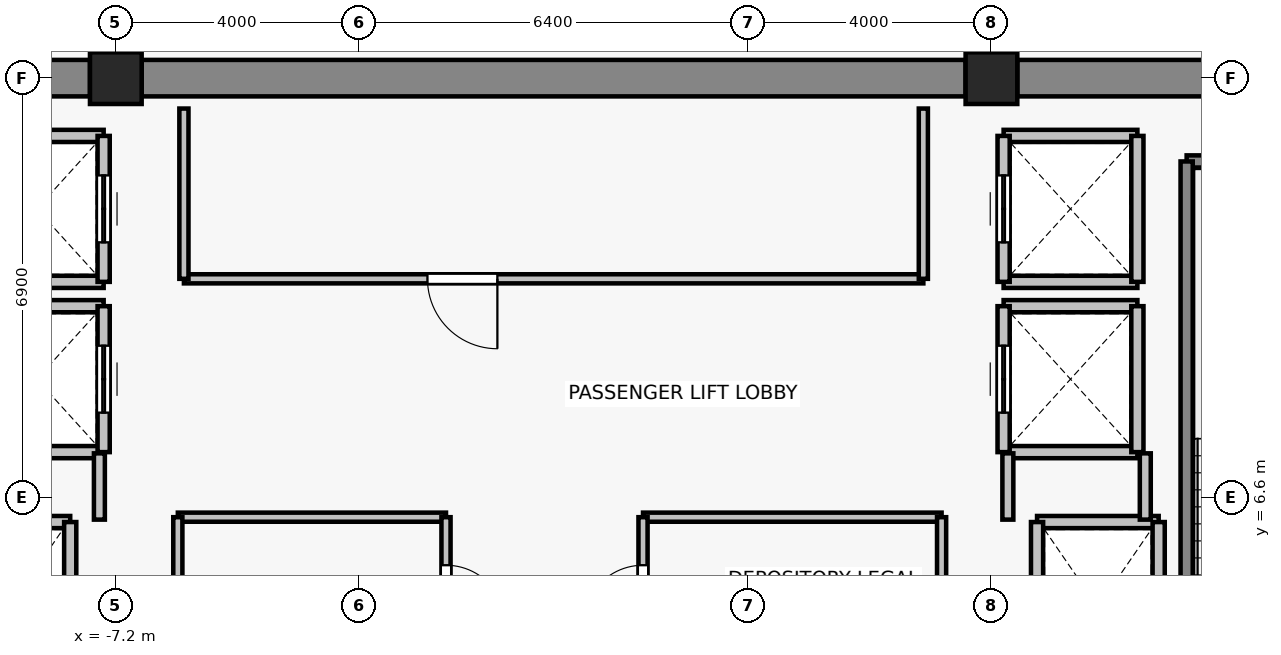
"""IFC4 building model, lengths in metres.
Left out: names, types, materials, properties, quantities, classifications, styles, units other than length and angle.
Written with IfcOpenShell. Run it as: python <this file> out.ifc"""

import sys

from ifc_helpers import new_model, si_unit, direction, frame, frame_2d, origin, origin_2d, place, context, subcontext, project, spatial, rectangle, extrude, source, transform, mapped, element, fill, save


model = new_model("IFC4")
c1 = context("Model", 3, precision=1e-05, world=origin(), true_north=direction((0.0, 1.0)))
c2 = subcontext(c1, "Body", "Model", "MODEL_VIEW")
j1 = project(units=[si_unit("LENGTHUNIT", "METRE"), si_unit("PLANEANGLEUNIT", "RADIAN")], contexts=[c1])
p1 = place(None, origin())
s1 = spatial("IfcSite", under=j1, at=p1, CompositionType="ELEMENT")
p2 = place(p1, origin())
s2 = spatial("IfcBuilding", under=s1, at=p2, CompositionType="ELEMENT")
p3 = place(p2, frame((0.0, 0.0, 232.0)))
s3 = spatial("IfcBuildingStorey", under=s2, at=p3, CompositionType="ELEMENT", Elevation=232.0)
for number, where, z_axis, x_axis in (
    (1, (-7.2, 13.5, 0.0), (0.0, 0.0, 1.0), (1.0, 0.0, 0.0)),
    (2, (7.2, 13.5, 0.0), (0.0, 0.0, 1.0), (1.0, 0.0, 0.0)),
):
    element("IfcColumn", number, at=place(p3, frame(where, z_axis=z_axis, x_axis=x_axis)), inside=s3, PredefinedType="COLUMN", context=c2, shape_type="SweptSolid", body=[
        extrude(rectangle(XDim=0.85, YDim=0.85, at=origin_2d()), origin(), (0.0, 0.0, 1.0), 3.3),
    ])
p4 = place(p3, frame((-13.975, 13.5, 0.0), z_axis=(0.0, 0.0, 1.0), x_axis=(1.0, 0.0, 0.0)))
e3 = element("IfcWall", 3, at=p4, inside=s3, PredefinedType="SHEAR", context=c2, shape_type="SweptSolid", body=[
    extrude(rectangle(XDim=6.35, YDim=0.6, at=frame_2d((3.175, 0.0))), origin(), (0.0, 0.0, 1.0), 3.075),
])
p5 = place(p3, frame((-6.775, 13.5, 0.0), z_axis=(0.0, 0.0, 1.0), x_axis=(1.0, 0.0, 0.0)))
e4 = element("IfcWall", 4, at=p5, inside=s3, PredefinedType="SHEAR", context=c2, shape_type="SweptSolid", body=[
    extrude(rectangle(XDim=13.55, YDim=0.6, at=frame_2d((6.775, 0.0))), origin(), (0.0, 0.0, 1.0), 3.075),
])
p6 = place(p3, frame((7.625, 13.5, 0.0), z_axis=(0.0, 0.0, 1.0), x_axis=(1.0, 0.0, 0.0)))
e5 = element("IfcWall", 5, at=p6, inside=s3, PredefinedType="SHEAR", context=c2, shape_type="SweptSolid", body=[
    extrude(rectangle(XDim=6.35, YDim=0.6, at=frame_2d((3.175, 0.0))), origin(), (0.0, 0.0, 1.0), 3.075),
])
p7 = place(p3, frame((-9.95, 6.2, 0.0), z_axis=(0.0, 0.0, 1.0), x_axis=(1.0, 0.0, 0.0)))
e6 = element("IfcWall", 6, at=p7, inside=s3, PredefinedType="SOLIDWALL", context=c2, shape_type="SweptSolid", body=[
    extrude(rectangle(XDim=2.0, YDim=0.2, at=frame_2d((1.0, 0.0))), origin(), (0.0, 0.0, 1.0), 3.075),
])
p8 = place(p3, frame((-7.95, 6.2, 0.0), z_axis=(0.0, 0.0, 1.0), x_axis=(0.0, -1.0, 0.0)))
e7 = element("IfcWall", 7, at=p8, inside=s3, PredefinedType="SOLIDWALL", context=c2, shape_type="SweptSolid", body=[
    extrude(rectangle(XDim=2.8, YDim=0.2, at=frame_2d((1.4, 0.0))), origin(), (0.0, 0.0, 1.0), 3.075),
])
p9 = place(p3, frame((7.95, 6.2, 0.0), z_axis=(0.0, 0.0, 1.0), x_axis=(1.0, 0.0, 0.0)))
e8 = element("IfcWall", 8, at=p9, inside=s3, PredefinedType="SOLIDWALL", context=c2, shape_type="SweptSolid", body=[
    extrude(rectangle(XDim=2.0, YDim=0.2, at=frame_2d((1.0, 0.0))), origin(), (0.0, 0.0, 1.0), 3.075),
])
for number, where, z_axis, x_axis in (
    (9, (7.95, 3.4, 0.0), (0.0, 0.0, 1.0), (0.0, 1.0, 0.0)),
    (10, (9.95, 6.2, 0.0), (0.0, 0.0, 1.0), (0.0, -1.0, 0.0)),
):
    element("IfcWall", number, at=place(p3, frame(where, z_axis=z_axis, x_axis=x_axis)), inside=s3, PredefinedType="SOLIDWALL", context=c2, shape_type="SweptSolid", body=[
        extrude(rectangle(XDim=2.8, YDim=0.2, at=frame_2d((1.4, 0.0))), origin(), (0.0, 0.0, 1.0), 3.075),
    ])
for number, where, z_axis, x_axis in (
    (11, (-7.4, 7.35, 0.0), (0.0, 0.0, 1.0), (-1.0, 0.0, 0.0)),
    (12, (-9.6, 9.75, 0.0), (0.0, 0.0, 1.0), (1.0, 0.0, 0.0)),
):
    element("IfcWall", number, at=place(p3, frame(where, z_axis=z_axis, x_axis=x_axis)), inside=s3, PredefinedType="SOLIDWALL", context=c2, shape_type="SweptSolid", body=[
        extrude(rectangle(XDim=2.2, YDim=0.2, at=frame_2d((1.1, 0.0))), origin(), (0.0, 0.0, 1.0), 2.615),
    ])
p10 = place(p3, frame((-7.4, 9.75, 0.0), z_axis=(0.0, 0.0, 1.0), x_axis=(0.0, -1.0, 0.0)))
e13 = element("IfcWall", 13, at=p10, inside=s3, PredefinedType="SOLIDWALL", context=c2, shape_type="SweptSolid", body=[
    extrude(rectangle(XDim=2.4, YDim=0.2, at=frame_2d((1.2, 0.0))), origin(), (0.0, 0.0, 1.0), 2.615),
])
p11 = place(p10, frame((0.65, 0.0, 0.0)))
e14 = element("IfcOpeningElement", 14, at=p11, cuts=e13, PredefinedType="OPENING", context=c2, shape_type="SweptSolid", body=[
    extrude(rectangle(XDim=1.1, YDim=2.2, at=frame_2d((0.55, 1.1))), frame((0.0, 0.11, 0.0), z_axis=(0.0, -1.0, 0.0), x_axis=(1.0, 0.0, 0.0)), (0.0, 0.0, 1.0), 0.22),
])
for number, where, z_axis, x_axis in (
    (15, (-7.4, 10.15, 0.0), (0.0, 0.0, 1.0), (-1.0, 0.0, 0.0)),
    (16, (-9.6, 12.55, 0.0), (0.0, 0.0, 1.0), (1.0, 0.0, 0.0)),
):
    element("IfcWall", number, at=place(p3, frame(where, z_axis=z_axis, x_axis=x_axis)), inside=s3, PredefinedType="SOLIDWALL", context=c2, shape_type="SweptSolid", body=[
        extrude(rectangle(XDim=2.2, YDim=0.2, at=frame_2d((1.1, 0.0))), origin(), (0.0, 0.0, 1.0), 2.615),
    ])
p12 = place(p3, frame((-7.4, 12.55, 0.0), z_axis=(0.0, 0.0, 1.0), x_axis=(0.0, -1.0, 0.0)))
e17 = element("IfcWall", 17, at=p12, inside=s3, PredefinedType="SOLIDWALL", context=c2, shape_type="SweptSolid", body=[
    extrude(rectangle(XDim=2.4, YDim=0.2, at=frame_2d((1.2, 0.0))), origin(), (0.0, 0.0, 1.0), 2.615),
])
p13 = place(p12, frame((0.65, 0.0, 0.0)))
e18 = element("IfcOpeningElement", 18, at=p13, cuts=e17, PredefinedType="OPENING", context=c2, shape_type="SweptSolid", body=[
    extrude(rectangle(XDim=1.1, YDim=2.2, at=frame_2d((0.55, 1.1))), frame((0.0, 0.11, 0.0), z_axis=(0.0, -1.0, 0.0), x_axis=(1.0, 0.0, 0.0)), (0.0, 0.0, 1.0), 0.22),
])
for number, where, z_axis, x_axis in (
    (19, (9.6, 7.35, 0.0), (0.0, 0.0, 1.0), (-1.0, 0.0, 0.0)),
    (20, (7.4, 9.75, 0.0), (0.0, 0.0, 1.0), (1.0, 0.0, 0.0)),
):
    element("IfcWall", number, at=place(p3, frame(where, z_axis=z_axis, x_axis=x_axis)), inside=s3, PredefinedType="SOLIDWALL", context=c2, shape_type="SweptSolid", body=[
        extrude(rectangle(XDim=2.2, YDim=0.2, at=frame_2d((1.1, 0.0))), origin(), (0.0, 0.0, 1.0), 2.615),
    ])
p14 = place(p3, frame((7.4, 7.35, 0.0), z_axis=(0.0, 0.0, 1.0), x_axis=(0.0, 1.0, 0.0)))
e21 = element("IfcWall", 21, at=p14, inside=s3, PredefinedType="SOLIDWALL", context=c2, shape_type="SweptSolid", body=[
    extrude(rectangle(XDim=2.4, YDim=0.2, at=frame_2d((1.2, 0.0))), origin(), (0.0, 0.0, 1.0), 2.615),
])
p15 = place(p14, frame((0.65, 0.0, 0.0)))
e22 = element("IfcOpeningElement", 22, at=p15, cuts=e21, PredefinedType="OPENING", context=c2, shape_type="SweptSolid", body=[
    extrude(rectangle(XDim=1.1, YDim=2.2, at=frame_2d((0.55, 1.1))), frame((0.0, 0.11, 0.0), z_axis=(0.0, -1.0, 0.0), x_axis=(1.0, 0.0, 0.0)), (0.0, 0.0, 1.0), 0.22),
])
p16 = place(p3, frame((9.6, 9.75, 0.0), z_axis=(0.0, 0.0, 1.0), x_axis=(0.0, -1.0, 0.0)))
e23 = element("IfcWall", 23, at=p16, inside=s3, PredefinedType="SOLIDWALL", context=c2, shape_type="SweptSolid", body=[
    extrude(rectangle(XDim=2.4, YDim=0.2, at=frame_2d((1.2, 0.0))), origin(), (0.0, 0.0, 1.0), 3.075),
])
for number, where, z_axis, x_axis in (
    (24, (9.6, 10.15, 0.0), (0.0, 0.0, 1.0), (-1.0, 0.0, 0.0)),
    (25, (7.4, 12.55, 0.0), (0.0, 0.0, 1.0), (1.0, 0.0, 0.0)),
):
    element("IfcWall", number, at=place(p3, frame(where, z_axis=z_axis, x_axis=x_axis)), inside=s3, PredefinedType="SOLIDWALL", context=c2, shape_type="SweptSolid", body=[
        extrude(rectangle(XDim=2.2, YDim=0.2, at=frame_2d((1.1, 0.0))), origin(), (0.0, 0.0, 1.0), 2.615),
    ])
p17 = place(p3, frame((7.4, 10.15, 0.0), z_axis=(0.0, 0.0, 1.0), x_axis=(0.0, 1.0, 0.0)))
e26 = element("IfcWall", 26, at=p17, inside=s3, PredefinedType="SOLIDWALL", context=c2, shape_type="SweptSolid", body=[
    extrude(rectangle(XDim=2.4, YDim=0.2, at=frame_2d((1.2, 0.0))), origin(), (0.0, 0.0, 1.0), 2.615),
])
p18 = place(p17, frame((0.65, 0.0, 0.0)))
e27 = element("IfcOpeningElement", 27, at=p18, cuts=e26, PredefinedType="OPENING", context=c2, shape_type="SweptSolid", body=[
    extrude(rectangle(XDim=1.1, YDim=2.2, at=frame_2d((0.55, 1.1))), frame((0.0, 0.11, 0.0), z_axis=(0.0, -1.0, 0.0), x_axis=(1.0, 0.0, 0.0)), (0.0, 0.0, 1.0), 0.22),
])
p19 = place(p3, frame((9.6, 12.55, 0.0), z_axis=(0.0, 0.0, 1.0), x_axis=(0.0, -1.0, 0.0)))
e28 = element("IfcWall", 28, at=p19, inside=s3, PredefinedType="SOLIDWALL", context=c2, shape_type="SweptSolid", body=[
    extrude(rectangle(XDim=2.4, YDim=0.2, at=frame_2d((1.2, 0.0))), origin(), (0.0, 0.0, 1.0), 3.075),
])
p20 = place(p3, frame((10.41, 12.13, 0.0), z_axis=(0.0, 0.0, 1.0), x_axis=(1.0, 0.0, 0.0)))
e29 = element("IfcWall", 29, at=p20, inside=s3, PredefinedType="SOLIDWALL", context=c2, shape_type="SweptSolid", body=[
    extrude(rectangle(XDim=3.52, YDim=0.2, at=frame_2d((1.76, 0.0))), origin(), (0.0, 0.0, 1.0), 3.075),
])
p21 = place(p3, frame((10.41, 3.29, 0.0), z_axis=(0.0, 0.0, 1.0), x_axis=(0.0, 1.0, 0.0)))
e30 = element("IfcWall", 30, at=p21, inside=s3, PredefinedType="SOLIDWALL", context=c2, shape_type="SweptSolid", body=[
    extrude(rectangle(XDim=8.84, YDim=0.2, at=frame_2d((4.42, 0.0))), origin(), (0.0, 0.0, 1.0), 3.075),
])
for number, where, z_axis, x_axis in (
    (31, (-7.47, 7.33, 0.0), (0.0, 0.0, 1.0), (0.0, -1.0, 0.0)),
    (32, (7.47, 6.24, 0.0), (0.0, 0.0, 1.0), (0.0, 1.0, 0.0)),
):
    element("IfcWall", number, at=place(p3, frame(where, z_axis=z_axis, x_axis=x_axis)), inside=s3, PredefinedType="PARTITIONING", context=c2, shape_type="SweptSolid", body=[
        extrude(rectangle(XDim=1.09, YDim=0.18, at=frame_2d((0.545, 0.0))), origin(), (0.0, 0.0, 1.0), 2.615),
    ])
p22 = place(p3, frame((9.73, 7.33, 0.0), z_axis=(0.0, 0.0, 1.0), x_axis=(0.0, -1.0, 0.0)))
e33 = element("IfcWall", 33, at=p22, inside=s3, PredefinedType="PARTITIONING", context=c2, shape_type="SweptSolid", body=[
    extrude(rectangle(XDim=1.09, YDim=0.18, at=frame_2d((0.545, 0.0))), origin(), (0.0, 0.0, 1.0), 3.075),
])
p23 = place(p3, frame((6.08, 10.2, 0.0), z_axis=(0.0, 0.0, 1.0), x_axis=(-1.0, 0.0, 0.0)))
e34 = element("IfcWall", 34, at=p23, inside=s3, PredefinedType="PARTITIONING", context=c2, shape_type="SweptSolid", body=[
    extrude(rectangle(XDim=12.16, YDim=0.15, at=frame_2d((6.08, 0.0))), origin(), (0.0, 0.0, 1.0), 2.59),
])
p24 = place(p23, frame((7.005, 0.0, 0.0)))
e35 = element("IfcOpeningElement", 35, at=p24, cuts=e34, PredefinedType="OPENING", context=c2, shape_type="SweptSolid", body=[
    extrude(rectangle(XDim=1.15, YDim=2.15, at=frame_2d((0.575, 1.075))), frame((0.0, 0.085, 0.0), z_axis=(0.0, -1.0, 0.0), x_axis=(1.0, 0.0, 0.0)), (0.0, 0.0, 1.0), 0.17),
])
for number, where, z_axis, x_axis in (
    (36, (-6.08, 10.2, 0.0), (0.0, 0.0, 1.0), (0.0, 1.0, 0.0)),
    (37, (6.08, 13.0, 0.0), (0.0, 0.0, 1.0), (0.0, -1.0, 0.0)),
):
    element("IfcWall", number, at=place(p3, frame(where, z_axis=z_axis, x_axis=x_axis)), inside=s3, PredefinedType="PARTITIONING", context=c2, shape_type="SweptSolid", body=[
        extrude(rectangle(XDim=2.8, YDim=0.15, at=frame_2d((1.4, 0.0))), origin(), (0.0, 0.0, 1.0), 3.075),
    ])
p25 = place(p3, frame((-6.18, 6.28, 0.0), z_axis=(0.0, 0.0, 1.0), x_axis=(1.0, 0.0, 0.0)))
e38 = element("IfcWall", 38, at=p25, inside=s3, PredefinedType="PARTITIONING", context=c2, shape_type="SweptSolid", body=[
    extrude(rectangle(XDim=4.41, YDim=0.15, at=frame_2d((2.205, 0.0))), origin(), (0.0, 0.0, 1.0), 3.075),
])
p26 = place(p3, frame((-6.18, 3.76, 0.0), z_axis=(0.0, 0.0, 1.0), x_axis=(0.0, 1.0, 0.0)))
e39 = element("IfcWall", 39, at=p26, inside=s3, PredefinedType="PARTITIONING", context=c2, shape_type="SweptSolid", body=[
    extrude(rectangle(XDim=2.52, YDim=0.15, at=frame_2d((1.26, 0.0))), origin(), (0.0, 0.0, 1.0), 3.075),
])
p27 = place(p3, frame((-1.77, 6.28, 0.0), z_axis=(0.0, 0.0, 1.0), x_axis=(0.0, -1.0, 0.0)))
e40 = element("IfcWall", 40, at=p27, inside=s3, PredefinedType="PARTITIONING", context=c2, shape_type="SweptSolid", body=[
    extrude(rectangle(XDim=2.52, YDim=0.15, at=frame_2d((1.26, 0.0))), origin(), (0.0, 0.0, 1.0), 3.075),
])
p28 = place(p27, frame((0.79, 0.0, 0.0)))
e41 = element("IfcOpeningElement", 41, at=p28, cuts=e40, PredefinedType="OPENING", context=c2, shape_type="SweptSolid", body=[
    extrude(rectangle(XDim=0.98, YDim=2.15, at=frame_2d((0.49, 1.075))), frame((0.0, 0.085, 0.0), z_axis=(0.0, -1.0, 0.0), x_axis=(1.0, 0.0, 0.0)), (0.0, 0.0, 1.0), 0.17),
])
p29 = place(p3, frame((1.47, 6.28, 0.0), z_axis=(0.0, 0.0, 1.0), x_axis=(1.0, 0.0, 0.0)))
e42 = element("IfcWall", 42, at=p29, inside=s3, PredefinedType="PARTITIONING", context=c2, shape_type="SweptSolid", body=[
    extrude(rectangle(XDim=4.91, YDim=0.15, at=frame_2d((2.455, 0.0))), origin(), (0.0, 0.0, 1.0), 3.075),
])
p30 = place(p3, frame((1.47, 3.76, 0.0), z_axis=(0.0, 0.0, 1.0), x_axis=(0.0, 1.0, 0.0)))
e43 = element("IfcWall", 43, at=p30, inside=s3, PredefinedType="PARTITIONING", context=c2, shape_type="SweptSolid", body=[
    extrude(rectangle(XDim=2.52, YDim=0.15, at=frame_2d((1.26, 0.0))), origin(), (0.0, 0.0, 1.0), 3.075),
])
p31 = place(p30, frame((0.75, 0.0, 0.0)))
e44 = element("IfcOpeningElement", 44, at=p31, cuts=e43, PredefinedType="OPENING", context=c2, shape_type="SweptSolid", body=[
    extrude(rectangle(XDim=0.98, YDim=2.15, at=frame_2d((0.49, 1.075))), frame((0.0, 0.085, 0.0), z_axis=(0.0, -1.0, 0.0), x_axis=(1.0, 0.0, 0.0)), (0.0, 0.0, 1.0), 0.17),
])
p32 = place(p3, frame((6.38, 6.28, 0.0), z_axis=(0.0, 0.0, 1.0), x_axis=(0.0, -1.0, 0.0)))
e45 = element("IfcWall", 45, at=p32, inside=s3, PredefinedType="PARTITIONING", context=c2, shape_type="SweptSolid", body=[
    extrude(rectangle(XDim=2.52, YDim=0.15, at=frame_2d((1.26, 0.0))), origin(), (0.0, 0.0, 1.0), 3.075),
])
m1 = source(origin(), c2, "Body", "SweptSolid", [
    extrude(rectangle(XDim=1.1, YDim=2.2, at=frame_2d((0.55, 1.1))), frame((0.0, 0.025, 0.0), z_axis=(0.0, -1.0, 0.0), x_axis=(1.0, 0.0, 0.0)), (0.0, 0.0, 1.0), 0.05),
])
p33 = place(p11, origin())
e46 = element("IfcDoor", 46, at=p33, inside=s3, OperationType="DOUBLE_DOOR_SLIDING", PredefinedType="DOOR", context=c2, shape_type="MappedRepresentation", body=[
    mapped(m1, transform((0.0, 0.0, 0.0), x_axis=(1.0, 0.0, 0.0), y_axis=(0.0, 1.0, 0.0), z_axis=(0.0, 0.0, 1.0), scale=1.0)),
])
fill(e14, e46)
p34 = place(p13, origin())
e47 = element("IfcDoor", 47, at=p34, inside=s3, OperationType="DOUBLE_DOOR_SLIDING", PredefinedType="DOOR", context=c2, shape_type="MappedRepresentation", body=[
    mapped(m1, transform((0.0, 0.0, 0.0), x_axis=(1.0, 0.0, 0.0), y_axis=(0.0, 1.0, 0.0), z_axis=(0.0, 0.0, 1.0), scale=1.0)),
])
fill(e18, e47)
p35 = place(p15, origin())
e48 = element("IfcDoor", 48, at=p35, inside=s3, OperationType="DOUBLE_DOOR_SLIDING", PredefinedType="DOOR", context=c2, shape_type="MappedRepresentation", body=[
    mapped(m1, transform((0.0, 0.0, 0.0), x_axis=(1.0, 0.0, 0.0), y_axis=(0.0, 1.0, 0.0), z_axis=(0.0, 0.0, 1.0), scale=1.0)),
])
fill(e22, e48)
p36 = place(p18, origin())
e49 = element("IfcDoor", 49, at=p36, inside=s3, OperationType="DOUBLE_DOOR_SLIDING", PredefinedType="DOOR", context=c2, shape_type="MappedRepresentation", body=[
    mapped(m1, transform((0.0, 0.0, 0.0), x_axis=(1.0, 0.0, 0.0), y_axis=(0.0, 1.0, 0.0), z_axis=(0.0, 0.0, 1.0), scale=1.0)),
])
fill(e27, e49)
m2 = source(origin(), c2, "Body", "SweptSolid", [
    extrude(rectangle(XDim=1.15, YDim=2.15, at=frame_2d((0.575, 1.075))), frame((0.0, 0.025, 0.0), z_axis=(0.0, -1.0, 0.0), x_axis=(1.0, 0.0, 0.0)), (0.0, 0.0, 1.0), 0.05),
])
p37 = place(p24, origin())
e50 = element("IfcDoor", 50, at=p37, inside=s3, OperationType="SINGLE_SWING_LEFT", PredefinedType="DOOR", context=c2, shape_type="MappedRepresentation", body=[
    mapped(m2, transform((0.0, 0.0, 0.0), x_axis=(1.0, 0.0, 0.0), y_axis=(0.0, 1.0, 0.0), z_axis=(0.0, 0.0, 1.0), scale=1.0)),
])
fill(e35, e50)
m3 = source(origin(), c2, "Body", "SweptSolid", [
    extrude(rectangle(XDim=0.98, YDim=2.15, at=frame_2d((0.49, 1.075))), frame((0.0, 0.025, 0.0), z_axis=(0.0, -1.0, 0.0), x_axis=(1.0, 0.0, 0.0)), (0.0, 0.0, 1.0), 0.05),
])
p38 = place(p28, origin())
e51 = element("IfcDoor", 51, at=p38, inside=s3, OperationType="SINGLE_SWING_RIGHT", PredefinedType="DOOR", context=c2, shape_type="MappedRepresentation", body=[
    mapped(m3, transform((0.0, 0.0, 0.0), x_axis=(1.0, 0.0, 0.0), y_axis=(0.0, 1.0, 0.0), z_axis=(0.0, 0.0, 1.0), scale=1.0)),
])
fill(e41, e51)
p39 = place(p31, origin())
e52 = element("IfcDoor", 52, at=p39, inside=s3, OperationType="SINGLE_SWING_LEFT", PredefinedType="DOOR", context=c2, shape_type="MappedRepresentation", body=[
    mapped(m3, transform((0.0, 0.0, 0.0), x_axis=(1.0, 0.0, 0.0), y_axis=(0.0, 1.0, 0.0), z_axis=(0.0, 0.0, 1.0), scale=1.0)),
])
fill(e44, e52)
save(model, sys.argv[1])
